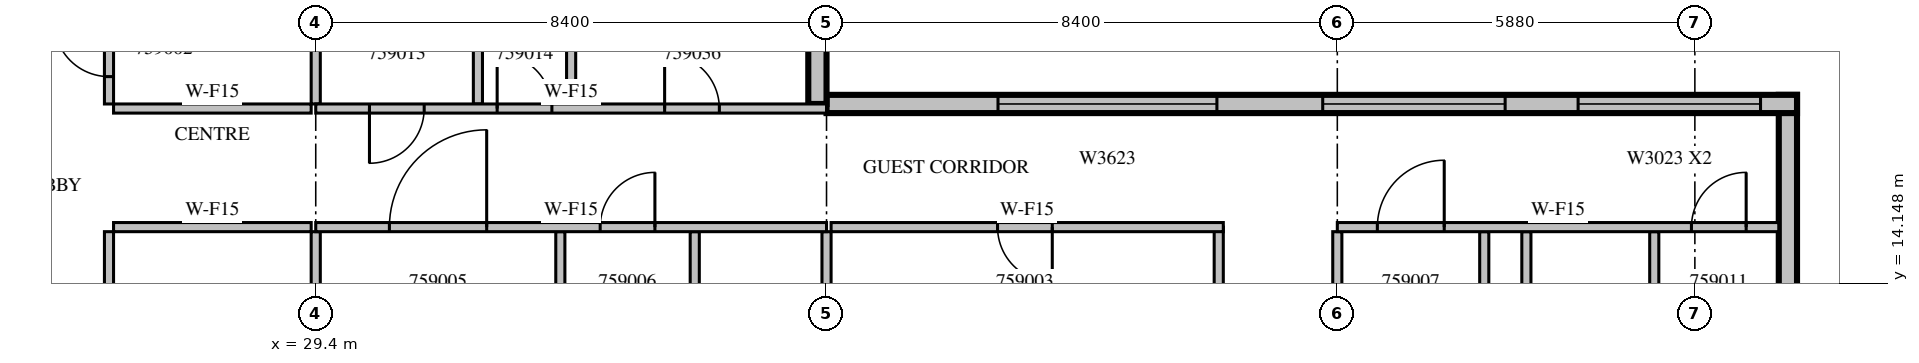
"""IFC4 building model, lengths in metres.
Left out: names, types, materials, properties, quantities, classifications, styles, units other than length and angle.
Written with IfcOpenShell. Run it as: python <this file> out.ifc"""

import sys

from ifc_helpers import new_model, si_unit, direction, frame, frame_2d, origin, place, context, subcontext, project, spatial, rectangle, extrude, source, transform, mapped, element, fill, save


model = new_model("IFC4")
c1 = context("Model", 3, precision=1e-05, world=origin(), true_north=direction((0.0, 1.0)))
c2 = subcontext(c1, "Body", "Model", "MODEL_VIEW")
j1 = project(units=[si_unit("LENGTHUNIT", "METRE"), si_unit("PLANEANGLEUNIT", "RADIAN")], contexts=[c1])
p1 = place(None, origin())
s1 = spatial("IfcSite", under=j1, at=p1, CompositionType="ELEMENT")
p2 = place(p1, origin())
s2 = spatial("IfcBuilding", under=s1, at=p2, CompositionType="ELEMENT")
p3 = place(p2, frame((0.0, 0.0, 257.6)))
s3 = spatial("IfcBuildingStorey", under=s2, at=p3, CompositionType="ELEMENT", Elevation=257.6)
m1 = source(origin(), c2, "Body", "SweptSolid", [
    extrude(rectangle(XDim=6.75, YDim=0.3, at=frame_2d((3.375, 0.0))), origin(), (0.0, 0.0, 1.0), 3.4),
])
p4 = place(p3, frame((53.61, 10.5, 0.0), z_axis=(0.0, 0.0, 1.0), x_axis=(0.0, 1.0, 0.0)))
e1 = element("IfcWall", 1, at=p4, inside=s3, PredefinedType="STANDARD", context=c2, shape_type="MappedRepresentation", body=[
    mapped(m1, transform((0.0, 0.0, 0.0), scale=1.0)),
])
m2 = source(origin(), c2, "Body", "SweptSolid", [
    extrude(rectangle(XDim=1.8, YDim=2.3, at=frame_2d((0.9, 1.15))), frame((0.0, 0.16, 0.0), z_axis=(0.0, -1.0, 0.0), x_axis=(1.0, 0.0, 0.0)), (0.0, 0.0, 1.0), 0.32),
])
p5 = place(p4, frame((0.787, 0.0, 0.6)))
e2 = element("IfcOpeningElement", 2, at=p5, cuts=e1, PredefinedType="OPENING", context=c2, shape_type="MappedRepresentation", body=[
    mapped(m2, transform((0.0, 0.0, 0.0), scale=1.0)),
])
m3 = source(origin(), c2, "Body", "SweptSolid", [
    extrude(rectangle(XDim=15.96, YDim=0.3, at=frame_2d((7.98, 0.0))), origin(), (0.0, 0.0, 1.0), 3.4),
])
p6 = place(p3, frame((53.76, 17.1, 0.0), z_axis=(0.0, 0.0, 1.0), x_axis=(-1.0, 0.0, 0.0)))
e3 = element("IfcWall", 3, at=p6, inside=s3, PredefinedType="STANDARD", context=c2, shape_type="MappedRepresentation", body=[
    mapped(m3, transform((0.0, 0.0, 0.0), scale=1.0)),
])
m4 = source(origin(), c2, "Body", "SweptSolid", [
    extrude(rectangle(XDim=3.0, YDim=2.3, at=frame_2d((1.5, 1.15))), frame((0.0, 0.16, 0.0), z_axis=(0.0, -1.0, 0.0), x_axis=(1.0, 0.0, 0.0)), (0.0, 0.0, 1.0), 0.32),
])
p7 = place(p6, frame((0.6, 0.0, 0.6)))
e4 = element("IfcOpeningElement", 4, at=p7, cuts=e3, PredefinedType="OPENING", context=c2, shape_type="MappedRepresentation", body=[
    mapped(m4, transform((0.0, 0.0, 0.0), scale=1.0)),
])
p8 = place(p6, frame((4.8, 0.0, 0.6)))
e5 = element("IfcOpeningElement", 5, at=p8, cuts=e3, PredefinedType="OPENING", context=c2, shape_type="MappedRepresentation", body=[
    mapped(m4, transform((0.0, 0.0, 0.0), scale=1.0)),
])
m5 = source(origin(), c2, "Body", "SweptSolid", [
    extrude(rectangle(XDim=3.6, YDim=2.3, at=frame_2d((1.8, 1.15))), frame((0.0, 0.16, 0.0), z_axis=(0.0, -1.0, 0.0), x_axis=(1.0, 0.0, 0.0)), (0.0, 0.0, 1.0), 0.32),
])
p9 = place(p6, frame((9.54, 0.0, 0.6)))
e6 = element("IfcOpeningElement", 6, at=p9, cuts=e3, PredefinedType="OPENING", context=c2, shape_type="MappedRepresentation", body=[
    mapped(m5, transform((0.0, 0.0, 0.0), scale=1.0)),
])
m6 = source(origin(), c2, "Body", "SweptSolid", [
    extrude(rectangle(XDim=3.1, YDim=0.3, at=frame_2d((1.55, 0.0))), origin(), (0.0, 0.0, 1.0), 3.4),
])
p10 = place(p3, frame((37.65, 17.1, 0.0), z_axis=(0.0, 0.0, 1.0), x_axis=(0.0, 1.0, 0.0)))
e7 = element("IfcWall", 7, at=p10, inside=s3, PredefinedType="STANDARD", context=c2, shape_type="MappedRepresentation", body=[
    mapped(m6, transform((0.0, 0.0, 0.0), scale=1.0)),
])
p11 = place(p10, frame((1.125, 0.0, 0.6)))
e8 = element("IfcOpeningElement", 8, at=p11, cuts=e7, PredefinedType="OPENING", context=c2, shape_type="MappedRepresentation", body=[
    mapped(m2, transform((0.0, 0.0, 0.0), scale=1.0)),
])
m7 = source(origin(), c2, "Body", "SweptSolid", [
    extrude(rectangle(XDim=4.295, YDim=0.15, at=frame_2d((2.147, 0.0))), origin(), (0.0, 0.0, 1.0), 3.4),
])
p12 = place(p3, frame((26.0, 15.0, 0.0), z_axis=(0.0, 0.0, 1.0), x_axis=(0.0, -1.0, 0.0)))
e9 = element("IfcWall", 9, at=p12, inside=s3, PredefinedType="PARTITIONING", context=c2, shape_type="MappedRepresentation", body=[
    mapped(m7, transform((0.0, 0.0, 0.0), scale=1.0)),
])
m8 = source(origin(), c2, "Body", "SweptSolid", [
    extrude(rectangle(XDim=0.9, YDim=2.1, at=frame_2d((0.45, 1.05))), frame((0.0, 0.085, 0.0), z_axis=(0.0, -1.0, 0.0), x_axis=(1.0, 0.0, 0.0)), (0.0, 0.0, 1.0), 0.17),
])
p13 = place(p12, frame((1.113, 0.0, 0.0)))
e10 = element("IfcOpeningElement", 10, at=p13, cuts=e9, PredefinedType="OPENING", context=c2, shape_type="MappedRepresentation", body=[
    mapped(m8, transform((0.0, 0.0, 0.0), scale=1.0)),
])
m9 = source(origin(), c2, "Body", "SweptSolid", [
    extrude(rectangle(XDim=3.6, YDim=0.15, at=frame_2d((1.8, 0.0))), origin(), (0.0, 0.0, 1.0), 3.4),
])
p14 = place(p3, frame((26.0, 20.7, 0.0), z_axis=(0.0, 0.0, 1.0), x_axis=(0.0, -1.0, 0.0)))
e11 = element("IfcWall", 11, at=p14, inside=s3, PredefinedType="PARTITIONING", context=c2, shape_type="MappedRepresentation", body=[
    mapped(m9, transform((0.0, 0.0, 0.0), scale=1.0)),
])
p15 = place(p14, frame((2.25, 0.0, 0.0)))
e12 = element("IfcOpeningElement", 12, at=p15, cuts=e11, PredefinedType="OPENING", context=c2, shape_type="MappedRepresentation", body=[
    mapped(m8, transform((0.0, 0.0, 0.0), scale=1.0)),
])
m10 = source(origin(), c2, "Body", "SweptSolid", [
    extrude(rectangle(XDim=3.25, YDim=0.15, at=frame_2d((1.625, 0.0))), origin(), (0.0, 0.0, 1.0), 3.4),
])
for number, where, z_axis, x_axis in (
    (13, (29.325, 15.075, 0.0), (0.0, 0.0, 1.0), (-1.0, 0.0, 0.0)),
    (14, (26.075, 17.025, 0.0), (0.0, 0.0, 1.0), (1.0, 0.0, 0.0)),
):
    element("IfcWall", number, at=place(p3, frame(where, z_axis=z_axis, x_axis=x_axis)), inside=s3, PredefinedType="PARTITIONING", context=c2, shape_type="MappedRepresentation", body=[
        mapped(m10, transform((0.0, 0.0, 0.0), scale=1.0)),
    ])
m11 = source(origin(), c2, "Body", "SweptSolid", [
    extrude(rectangle(XDim=4.101, YDim=0.15, at=frame_2d((2.05, 0.0))), origin(), (0.0, 0.0, 1.0), 3.4),
])
p16 = place(p3, frame((29.4, 10.899, 0.0), z_axis=(0.0, 0.0, 1.0), x_axis=(0.0, 1.0, 0.0)))
e15 = element("IfcWall", 15, at=p16, inside=s3, PredefinedType="PARTITIONING", context=c2, shape_type="MappedRepresentation", body=[
    mapped(m11, transform((0.0, 0.0, 0.0), scale=1.0)),
])
m12 = source(origin(), c2, "Body", "SweptSolid", [
    extrude(rectangle(XDim=3.101, YDim=0.15, at=frame_2d((1.55, 0.0))), origin(), (0.0, 0.0, 1.0), 3.4),
])
p17 = place(p3, frame((29.4, 17.1, 0.0), z_axis=(0.0, 0.0, 1.0), x_axis=(0.0, 1.0, 0.0)))
e16 = element("IfcWall", 16, at=p17, inside=s3, PredefinedType="PARTITIONING", context=c2, shape_type="MappedRepresentation", body=[
    mapped(m12, transform((0.0, 0.0, 0.0), scale=1.0)),
])
m13 = source(origin(), c2, "Body", "SweptSolid", [
    extrude(rectangle(XDim=3.175, YDim=0.15, at=frame_2d((1.587, 0.0))), origin(), (0.0, 0.0, 1.0), 3.4),
])
p18 = place(p3, frame((44.25, 11.9, 0.0), z_axis=(0.0, 0.0, 1.0), x_axis=(0.0, 1.0, 0.0)))
e17 = element("IfcWall", 17, at=p18, inside=s3, PredefinedType="PARTITIONING", context=c2, shape_type="MappedRepresentation", body=[
    mapped(m13, transform((0.0, 0.0, 0.0), scale=1.0)),
])
m14 = source(origin(), c2, "Body", "SweptSolid", [
    extrude(rectangle(XDim=6.45, YDim=0.15, at=frame_2d((3.225, 0.0))), origin(), (0.0, 0.0, 1.0), 3.4),
])
p19 = place(p3, frame((44.325, 15.075, 0.0), z_axis=(0.0, 0.0, 1.0), x_axis=(-1.0, 0.0, 0.0)))
e18 = element("IfcWall", 18, at=p19, inside=s3, PredefinedType="PARTITIONING", context=c2, shape_type="MappedRepresentation", body=[
    mapped(m14, transform((0.0, 0.0, 0.0), scale=1.0)),
])
p20 = place(p19, frame((2.812, 0.0, 0.0)))
e19 = element("IfcOpeningElement", 19, at=p20, cuts=e18, PredefinedType="OPENING", context=c2, shape_type="MappedRepresentation", body=[
    mapped(m8, transform((0.0, 0.0, 0.0), scale=1.0)),
])
p21 = place(p3, frame((33.422, 10.705, 0.0), z_axis=(0.0, 0.0, 1.0), x_axis=(0.0, 1.0, 0.0)))
e20 = element("IfcWall", 20, at=p21, inside=s3, PredefinedType="PARTITIONING", context=c2, shape_type="MappedRepresentation", body=[
    mapped(m7, transform((0.0, 0.0, 0.0), scale=1.0)),
])
p22 = place(p3, frame((35.633, 10.705, 0.0), z_axis=(0.0, 0.0, 1.0), x_axis=(0.0, 1.0, 0.0)))
e21 = element("IfcWall", 21, at=p22, inside=s3, PredefinedType="PARTITIONING", context=c2, shape_type="MappedRepresentation", body=[
    mapped(m7, transform((0.0, 0.0, 0.0), scale=1.0)),
])
p23 = place(p22, frame((1.698, 0.0, 0.0)))
e22 = element("IfcOpeningElement", 22, at=p23, cuts=e21, PredefinedType="OPENING", context=c2, shape_type="MappedRepresentation", body=[
    mapped(m8, transform((0.0, 0.0, 0.0), scale=1.0)),
])
p24 = place(p3, frame((37.8, 10.899, 0.0), z_axis=(0.0, 0.0, 1.0), x_axis=(0.0, 1.0, 0.0)))
e23 = element("IfcWall", 23, at=p24, inside=s3, PredefinedType="PARTITIONING", context=c2, shape_type="MappedRepresentation", body=[
    mapped(m11, transform((0.0, 0.0, 0.0), scale=1.0)),
])
m15 = source(origin(), c2, "Body", "SweptSolid", [
    extrude(rectangle(XDim=3.95, YDim=0.15, at=frame_2d((1.975, 0.0))), origin(), (0.0, 0.0, 1.0), 3.4),
])
for number, where, z_axis, x_axis in (
    (24, (48.617, 11.05, 0.0), (0.0, 0.0, 1.0), (0.0, 1.0, 0.0)),
    (25, (49.309, 11.05, 0.0), (0.0, 0.0, 1.0), (0.0, 1.0, 0.0)),
    (26, (51.412, 11.05, 0.0), (0.0, 0.0, 1.0), (0.0, 1.0, 0.0)),
    (27, (46.2, 11.05, 0.0), (0.0, 0.0, 1.0), (0.0, 1.0, 0.0)),
):
    element("IfcWall", number, at=place(p3, frame(where, z_axis=z_axis, x_axis=x_axis)), inside=s3, PredefinedType="PARTITIONING", context=c2, shape_type="MappedRepresentation", body=[
        mapped(m15, transform((0.0, 0.0, 0.0), scale=1.0)),
    ])
for number, where, z_axis, x_axis in (
    (28, (32.067, 20.7, 0.0), (0.0, 0.0, 1.0), (0.0, -1.0, 0.0)),
    (29, (33.6, 17.1, 0.0), (0.0, 0.0, 1.0), (0.0, 1.0, 0.0)),
):
    element("IfcWall", number, at=place(p3, frame(where, z_axis=z_axis, x_axis=x_axis)), inside=s3, PredefinedType="PARTITIONING", context=c2, shape_type="MappedRepresentation", body=[
        mapped(m9, transform((0.0, 0.0, 0.0), scale=1.0)),
    ])
m16 = source(origin(), c2, "Body", "SweptSolid", [
    extrude(rectangle(XDim=8.4, YDim=0.15, at=frame_2d((4.2, 0.0))), origin(), (0.0, 0.0, 1.0), 3.4),
])
p25 = place(p3, frame((37.8, 15.075, 0.0), z_axis=(0.0, 0.0, 1.0), x_axis=(-1.0, 0.0, 0.0)))
e30 = element("IfcWall", 30, at=p25, inside=s3, PredefinedType="PARTITIONING", context=c2, shape_type="MappedRepresentation", body=[
    mapped(m16, transform((0.0, 0.0, 0.0), scale=1.0)),
])
m17 = source(origin(), c2, "Body", "SweptSolid", [
    extrude(rectangle(XDim=1.6, YDim=2.1, at=frame_2d((0.8, 1.05))), frame((0.0, 0.085, 0.0), z_axis=(0.0, -1.0, 0.0), x_axis=(1.0, 0.0, 0.0)), (0.0, 0.0, 1.0), 0.17),
])
p26 = place(p25, frame((5.589, 0.0, 0.0)))
e31 = element("IfcOpeningElement", 31, at=p26, cuts=e30, PredefinedType="OPENING", context=c2, shape_type="MappedRepresentation", body=[
    mapped(m17, transform((0.0, 0.0, 0.0), scale=1.0)),
])
p27 = place(p25, frame((2.822, 0.0, 0.0)))
e32 = element("IfcOpeningElement", 32, at=p27, cuts=e30, PredefinedType="OPENING", context=c2, shape_type="MappedRepresentation", body=[
    mapped(m8, transform((0.0, 0.0, 0.0), scale=1.0)),
])
m18 = source(origin(), c2, "Body", "SweptSolid", [
    extrude(rectangle(XDim=7.26, YDim=0.15, at=frame_2d((3.63, 0.0))), origin(), (0.0, 0.0, 1.0), 3.4),
])
p28 = place(p3, frame((53.46, 15.075, 0.0), z_axis=(0.0, 0.0, 1.0), x_axis=(-1.0, 0.0, 0.0)))
e33 = element("IfcWall", 33, at=p28, inside=s3, PredefinedType="PARTITIONING", context=c2, shape_type="MappedRepresentation", body=[
    mapped(m18, transform((0.0, 0.0, 0.0), scale=1.0)),
])
m19 = source(origin(), c2, "Body", "SweptSolid", [
    extrude(rectangle(XDim=1.1, YDim=2.1, at=frame_2d((0.55, 1.05))), frame((0.0, 0.085, 0.0), z_axis=(0.0, -1.0, 0.0), x_axis=(1.0, 0.0, 0.0)), (0.0, 0.0, 1.0), 0.17),
])
p29 = place(p28, frame((5.502, 0.0, 0.0)))
e34 = element("IfcOpeningElement", 34, at=p29, cuts=e33, PredefinedType="OPENING", context=c2, shape_type="MappedRepresentation", body=[
    mapped(m19, transform((0.0, 0.0, 0.0), scale=1.0)),
])
p30 = place(p28, frame((0.536, 0.0, 0.0)))
e35 = element("IfcOpeningElement", 35, at=p30, cuts=e33, PredefinedType="OPENING", context=c2, shape_type="MappedRepresentation", body=[
    mapped(m8, transform((0.0, 0.0, 0.0), scale=1.0)),
])
p31 = place(p3, frame((29.4, 17.025, 0.0), z_axis=(0.0, 0.0, 1.0), x_axis=(1.0, 0.0, 0.0)))
e36 = element("IfcWall", 36, at=p31, inside=s3, PredefinedType="PARTITIONING", context=c2, shape_type="MappedRepresentation", body=[
    mapped(m16, transform((0.0, 0.0, 0.0), scale=1.0)),
])
p32 = place(p31, frame((0.883, 0.0, 0.0)))
e37 = element("IfcOpeningElement", 37, at=p32, cuts=e36, PredefinedType="OPENING", context=c2, shape_type="MappedRepresentation", body=[
    mapped(m8, transform((0.0, 0.0, 0.0), scale=1.0)),
])
p33 = place(p31, frame((2.983, 0.0, 0.0)))
e38 = element("IfcOpeningElement", 38, at=p33, cuts=e36, PredefinedType="OPENING", context=c2, shape_type="MappedRepresentation", body=[
    mapped(m8, transform((0.0, 0.0, 0.0), scale=1.0)),
])
p34 = place(p31, frame((5.737, 0.0, 0.0)))
e39 = element("IfcOpeningElement", 39, at=p34, cuts=e36, PredefinedType="OPENING", context=c2, shape_type="MappedRepresentation", body=[
    mapped(m8, transform((0.0, 0.0, 0.0), scale=1.0)),
])
m20 = source(origin(), c2, "Body", "SweptSolid", [
    extrude(rectangle(XDim=3.0, YDim=2.3, at=frame_2d((1.5, 1.15))), frame((0.0, 0.03, 0.0), z_axis=(0.0, -1.0, 0.0), x_axis=(1.0, 0.0, 0.0)), (0.0, 0.0, 1.0), 0.06),
])
p35 = place(p7, origin())
e40 = element("IfcWindow", 40, at=p35, inside=s3, PartitioningType="SINGLE_PANEL", PredefinedType="WINDOW", context=c2, shape_type="MappedRepresentation", body=[
    mapped(m20, transform((0.0, 0.0, 0.0), scale=1.0)),
])
fill(e4, e40)
p36 = place(p8, origin())
e41 = element("IfcWindow", 41, at=p36, inside=s3, PartitioningType="SINGLE_PANEL", PredefinedType="WINDOW", context=c2, shape_type="MappedRepresentation", body=[
    mapped(m20, transform((0.0, 0.0, 0.0), scale=1.0)),
])
fill(e5, e41)
m21 = source(origin(), c2, "Body", "SweptSolid", [
    extrude(rectangle(XDim=3.6, YDim=2.3, at=frame_2d((1.8, 1.15))), frame((0.0, 0.03, 0.0), z_axis=(0.0, -1.0, 0.0), x_axis=(1.0, 0.0, 0.0)), (0.0, 0.0, 1.0), 0.06),
])
p37 = place(p9, origin())
e42 = element("IfcWindow", 42, at=p37, inside=s3, PartitioningType="SINGLE_PANEL", PredefinedType="WINDOW", context=c2, shape_type="MappedRepresentation", body=[
    mapped(m21, transform((0.0, 0.0, 0.0), scale=1.0)),
])
fill(e6, e42)
m22 = source(origin(), c2, "Body", "SweptSolid", [
    extrude(rectangle(XDim=0.9, YDim=2.1, at=frame_2d((0.45, 1.05))), frame((0.0, 0.025, 0.0), z_axis=(0.0, -1.0, 0.0), x_axis=(1.0, 0.0, 0.0)), (0.0, 0.0, 1.0), 0.05),
])
p38 = place(p15, origin())
e43 = element("IfcDoor", 43, at=p38, inside=s3, OperationType="SINGLE_SWING_RIGHT", PredefinedType="DOOR", context=c2, shape_type="MappedRepresentation", body=[
    mapped(m22, transform((0.0, 0.0, 0.0), scale=1.0)),
])
fill(e12, e43)
p39 = place(p20, origin())
e44 = element("IfcDoor", 44, at=p39, inside=s3, OperationType="SINGLE_SWING_LEFT", PredefinedType="DOOR", context=c2, shape_type="MappedRepresentation", body=[
    mapped(m22, transform((0.0, 0.0, 0.0), scale=1.0)),
])
fill(e19, e44)
m23 = source(origin(), c2, "Body", "SweptSolid", [
    extrude(rectangle(XDim=1.6, YDim=2.1, at=frame_2d((0.8, 1.05))), frame((0.0, 0.025, 0.0), z_axis=(0.0, -1.0, 0.0), x_axis=(1.0, 0.0, 0.0)), (0.0, 0.0, 1.0), 0.05),
])
p40 = place(p26, origin())
e45 = element("IfcDoor", 45, at=p40, inside=s3, OperationType="SINGLE_SWING_RIGHT", PredefinedType="DOOR", context=c2, shape_type="MappedRepresentation", body=[
    mapped(m23, transform((0.0, 0.0, 0.0), scale=1.0)),
])
fill(e31, e45)
p41 = place(p27, origin())
e46 = element("IfcDoor", 46, at=p41, inside=s3, OperationType="SINGLE_SWING_RIGHT", PredefinedType="DOOR", context=c2, shape_type="MappedRepresentation", body=[
    mapped(m22, transform((0.0, 0.0, 0.0), scale=1.0)),
])
fill(e32, e46)
m24 = source(origin(), c2, "Body", "SweptSolid", [
    extrude(rectangle(XDim=1.1, YDim=2.1, at=frame_2d((0.55, 1.05))), frame((0.0, 0.025, 0.0), z_axis=(0.0, -1.0, 0.0), x_axis=(1.0, 0.0, 0.0)), (0.0, 0.0, 1.0), 0.05),
])
p42 = place(p29, origin())
e47 = element("IfcDoor", 47, at=p42, inside=s3, OperationType="SINGLE_SWING_RIGHT", PredefinedType="DOOR", context=c2, shape_type="MappedRepresentation", body=[
    mapped(m24, transform((0.0, 0.0, 0.0), scale=1.0)),
])
fill(e34, e47)
p43 = place(p30, origin())
e48 = element("IfcDoor", 48, at=p43, inside=s3, OperationType="SINGLE_SWING_RIGHT", PredefinedType="DOOR", context=c2, shape_type="MappedRepresentation", body=[
    mapped(m22, transform((0.0, 0.0, 0.0), scale=1.0)),
])
fill(e35, e48)
p44 = place(p32, origin())
e49 = element("IfcDoor", 49, at=p44, inside=s3, OperationType="SINGLE_SWING_RIGHT", PredefinedType="DOOR", context=c2, shape_type="MappedRepresentation", body=[
    mapped(m22, transform((0.0, 0.0, 0.0), scale=1.0)),
])
fill(e37, e49)
p45 = place(p33, origin())
e50 = element("IfcDoor", 50, at=p45, inside=s3, OperationType="SINGLE_SWING_LEFT", PredefinedType="DOOR", context=c2, shape_type="MappedRepresentation", body=[
    mapped(m22, transform((0.0, 0.0, 0.0), scale=1.0)),
])
fill(e38, e50)
p46 = place(p34, origin())
e51 = element("IfcDoor", 51, at=p46, inside=s3, OperationType="SINGLE_SWING_LEFT", PredefinedType="DOOR", context=c2, shape_type="MappedRepresentation", body=[
    mapped(m22, transform((0.0, 0.0, 0.0), scale=1.0)),
])
fill(e39, e51)
save(model, sys.argv[1])
